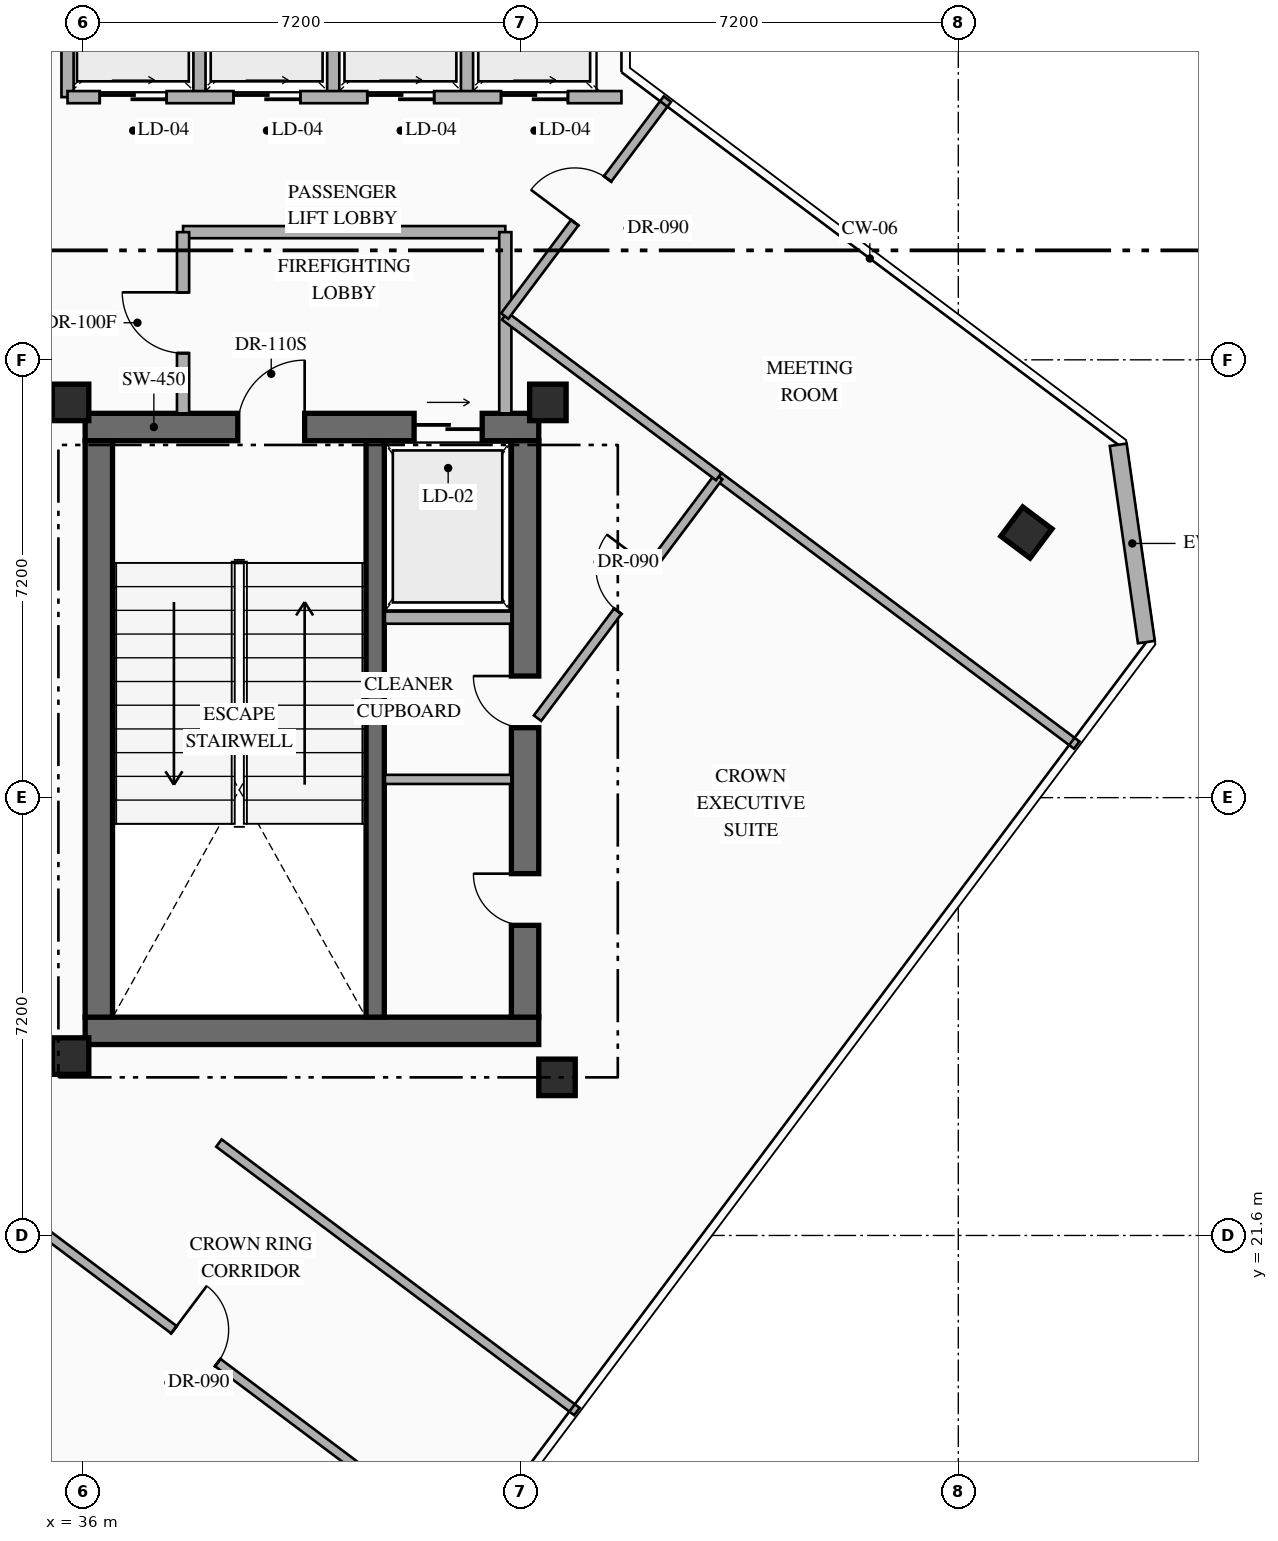
"""IFC4 building model, lengths in metres.
Left out: names, types, materials, properties, quantities, classifications, styles, units other than length and angle.
Written with IfcOpenShell. Run it as: python <this file> out.ifc"""

import sys

from ifc_helpers import new_model, si_unit, direction, frame, frame_2d, origin, origin_2d, place, context, subcontext, project, spatial, rectangle, hollow_rectangle, extrude, element, fill, save


model = new_model("IFC4")
c1 = context("Model", 3, precision=1e-05, world=origin(), true_north=direction((0.0, 1.0)))
c2 = subcontext(c1, "Body", "Model", "MODEL_VIEW")
j1 = project(units=[si_unit("LENGTHUNIT", "METRE"), si_unit("PLANEANGLEUNIT", "RADIAN")], contexts=[c1])
p1 = place(None, origin())
s1 = spatial("IfcSite", under=j1, at=p1, CompositionType="ELEMENT")
p2 = place(p1, origin())
s2 = spatial("IfcBuilding", under=s1, at=p2, CompositionType="ELEMENT")
p3 = place(p2, frame((0.0, 0.0, 277.95)))
s3 = spatial("IfcBuildingStorey", under=s2, at=p3, CompositionType="ELEMENT", Elevation=277.95)
p4 = place(p3, frame((36.04, 24.965, 0.0), z_axis=(0.0, 0.0, 1.0), x_axis=(1.0, 0.0, 0.0)))
e1 = element("IfcWall", 1, at=p4, inside=s3, PredefinedType="SHEAR", context=c2, shape_type="SweptSolid", body=[
    extrude(rectangle(XDim=7.46, YDim=0.45, at=frame_2d((3.73, 0.0))), origin(), (0.0, 0.0, 1.0), 4.0),
])
p5 = place(p3, frame((36.04, 34.895, 0.0), z_axis=(0.0, 0.0, 1.0), x_axis=(1.0, 0.0, 0.0)))
e2 = element("IfcWall", 2, at=p5, inside=s3, PredefinedType="SHEAR", context=c2, shape_type="SweptSolid", body=[
    extrude(rectangle(XDim=7.46, YDim=0.45, at=frame_2d((3.73, 0.0))), origin(), (0.0, 0.0, 1.0), 4.0),
])
p6 = place(p5, frame((2.51, 0.0, 0.0)))
e3 = element("IfcOpeningElement", 3, at=p6, cuts=e2, PredefinedType="OPENING", context=c2, shape_type="SweptSolid", body=[
    extrude(rectangle(XDim=1.1, YDim=2.2, at=frame_2d((0.55, 1.1))), frame((0.0, 0.235, 0.0), z_axis=(0.0, -1.0, 0.0), x_axis=(1.0, 0.0, 0.0)), (0.0, 0.0, 1.0), 0.47),
])
p7 = place(p5, frame((5.41, 0.0, 0.0)))
e4 = element("IfcOpeningElement", 4, at=p7, cuts=e2, PredefinedType="OPENING", context=c2, shape_type="SweptSolid", body=[
    extrude(rectangle(XDim=1.12, YDim=2.15, at=frame_2d((0.56, 1.075))), frame((0.0, 0.235, 0.0), z_axis=(0.0, -1.0, 0.0), x_axis=(1.0, 0.0, 0.0)), (0.0, 0.0, 1.0), 0.47),
])
p8 = place(p3, frame((36.265, 25.19, 0.0), z_axis=(0.0, 0.0, 1.0), x_axis=(0.0, 1.0, 0.0)))
e5 = element("IfcWall", 5, at=p8, inside=s3, PredefinedType="SHEAR", context=c2, shape_type="SweptSolid", body=[
    extrude(rectangle(XDim=9.48, YDim=0.45, at=frame_2d((4.74, 0.0))), origin(), (0.0, 0.0, 1.0), 4.0),
])
p9 = place(p3, frame((43.275, 25.19, 0.0), z_axis=(0.0, 0.0, 1.0), x_axis=(0.0, 1.0, 0.0)))
e6 = element("IfcWall", 6, at=p9, inside=s3, PredefinedType="SHEAR", context=c2, shape_type="SweptSolid", body=[
    extrude(rectangle(XDim=9.48, YDim=0.45, at=frame_2d((4.74, 0.0))), origin(), (0.0, 0.0, 1.0), 4.0),
])
p10 = place(p9, frame((1.51, 0.0, 0.0)))
e7 = element("IfcOpeningElement", 7, at=p10, cuts=e6, PredefinedType="OPENING", context=c2, shape_type="SweptSolid", body=[
    extrude(rectangle(XDim=0.85, YDim=2.08, at=frame_2d((0.425, 1.04))), frame((0.0, 0.235, 0.0), z_axis=(0.0, -1.0, 0.0), x_axis=(1.0, 0.0, 0.0)), (0.0, 0.0, 1.0), 0.47),
])
p11 = place(p9, frame((4.76, 0.0, 0.0)))
e8 = element("IfcOpeningElement", 8, at=p11, cuts=e6, PredefinedType="OPENING", context=c2, shape_type="SweptSolid", body=[
    extrude(rectangle(XDim=0.85, YDim=2.08, at=frame_2d((0.425, 1.04))), frame((0.0, 0.235, 0.0), z_axis=(0.0, -1.0, 0.0), x_axis=(1.0, 0.0, 0.0)), (0.0, 0.0, 1.0), 0.47),
])
p12 = place(p3, frame((40.81, 25.19, 0.0), z_axis=(0.0, 0.0, 1.0), x_axis=(0.0, 1.0, 0.0)))
e9 = element("IfcWall", 9, at=p12, inside=s3, PredefinedType="SHEAR", context=c2, shape_type="SweptSolid", body=[
    extrude(rectangle(XDim=9.48, YDim=0.3, at=frame_2d((4.74, 0.0))), origin(), (0.0, 0.0, 1.0), 4.0),
])
for number, where, z_axis, x_axis in (
    (10, (35.8, 24.55, 0.0), (0.0, 0.0, 1.0), (1.0, 0.0, 0.0)),
    (11, (43.8, 24.2, 0.0), (0.0, 0.0, 1.0), (1.0, 0.0, 0.0)),
    (12, (35.8, 35.3, 0.0), (0.0, 0.0, 1.0), (1.0, 0.0, 0.0)),
    (13, (43.65, 35.3, 0.0), (0.0, 0.0, 1.0), (1.0, 0.0, 0.0)),
    (14, (51.52, 33.16, 0.0), (0.0, 0.0, 1.0), (0.8, -0.6, 0.0)),
):
    element("IfcColumn", number, at=place(p3, frame(where, z_axis=z_axis, x_axis=x_axis)), inside=s3, PredefinedType="COLUMN", context=c2, shape_type="SweptSolid", body=[
        extrude(hollow_rectangle(XDim=0.6, YDim=0.6, WallThickness=0.025, at=origin_2d()), origin(), (0.0, 0.0, 1.0), 4.0),
    ])
p13 = place(p3, frame((53.03, 34.603, 0.0), z_axis=(0.0, 0.0, 1.0), x_axis=(0.141212810973, -0.989979263428, 0.0)))
e15 = element("IfcWall", 15, at=p13, inside=s3, PredefinedType="STANDARD", context=c2, shape_type="SweptSolid", body=[
    extrude(rectangle(XDim=3.278, YDim=0.28, at=frame_2d((1.639, 0.0))), origin(), (0.0, 0.0, 1.0), 3.74),
])
p14 = place(p3, frame((40.97, 31.76, 0.0), z_axis=(0.0, 0.0, 1.0), x_axis=(1.0, 0.0, 0.0)))
e16 = element("IfcWall", 16, at=p14, inside=s3, PredefinedType="STANDARD", context=c2, shape_type="SweptSolid", body=[
    extrude(rectangle(XDim=2.08, YDim=0.2, at=frame_2d((1.04, 0.0))), origin(), (0.0, 0.0, 1.0), 3.74),
])
p15 = place(p3, frame((40.97, 29.1, 0.0), z_axis=(0.0, 0.0, 1.0), x_axis=(1.0, 0.0, 0.0)))
e17 = element("IfcWall", 17, at=p15, inside=s3, PredefinedType="PARTITIONING", context=c2, shape_type="SweptSolid", body=[
    extrude(rectangle(XDim=2.08, YDim=0.15, at=frame_2d((1.04, 0.0))), origin(), (0.0, 0.0, 1.0), 3.74),
])
p16 = place(p3, frame((37.65, 38.1, 0.0), z_axis=(0.0, 0.0, 1.0), x_axis=(1.0, 0.0, 0.0)))
e18 = element("IfcWall", 18, at=p16, inside=s3, PredefinedType="STANDARD", context=c2, shape_type="SweptSolid", body=[
    extrude(rectangle(XDim=5.3, YDim=0.2, at=frame_2d((2.65, 0.0))), origin(), (0.0, 0.0, 1.0), 3.74),
])
p17 = place(p3, frame((42.95, 35.12, 0.0), z_axis=(0.0, 0.0, 1.0), x_axis=(0.0, 1.0, 0.0)))
e19 = element("IfcWall", 19, at=p17, inside=s3, PredefinedType="STANDARD", context=c2, shape_type="SweptSolid", body=[
    extrude(rectangle(XDim=2.98, YDim=0.2, at=frame_2d((1.49, 0.0))), origin(), (0.0, 0.0, 1.0), 3.74),
])
p18 = place(p3, frame((37.65, 35.12, 0.0), z_axis=(0.0, 0.0, 1.0), x_axis=(0.0, 1.0, 0.0)))
e20 = element("IfcWall", 20, at=p18, inside=s3, PredefinedType="STANDARD", context=c2, shape_type="SweptSolid", body=[
    extrude(rectangle(XDim=2.98, YDim=0.2, at=frame_2d((1.49, 0.0))), origin(), (0.0, 0.0, 1.0), 3.74),
])
p19 = place(p18, frame((0.99, 0.0, 0.0)))
e21 = element("IfcOpeningElement", 21, at=p19, cuts=e20, PredefinedType="OPENING", context=c2, shape_type="SweptSolid", body=[
    extrude(rectangle(XDim=1.0, YDim=2.2, at=frame_2d((0.5, 1.1))), frame((0.0, 0.11, 0.0), z_axis=(0.0, -1.0, 0.0), x_axis=(1.0, 0.0, 0.0)), (0.0, 0.0, 1.0), 0.22),
])
for number, where, z_axis, x_axis in (
    (22, (35.75, 40.32, 0.0), (0.0, 0.0, 1.0), (0.0, 1.0, 0.0)),
    (23, (37.92, 40.32, 0.0), (0.0, 0.0, 1.0), (0.0, 1.0, 0.0)),
    (24, (40.12, 40.32, 0.0), (0.0, 0.0, 1.0), (0.0, 1.0, 0.0)),
    (25, (42.32, 40.32, 0.0), (0.0, 0.0, 1.0), (0.0, 1.0, 0.0)),
):
    element("IfcWall", number, at=place(p3, frame(where, z_axis=z_axis, x_axis=x_axis)), inside=s3, PredefinedType="STANDARD", context=c2, shape_type="SweptSolid", body=[
        extrude(rectangle(XDim=2.16, YDim=0.2, at=frame_2d((1.08, 0.0))), origin(), (0.0, 0.0, 1.0), 3.74),
    ])
p20 = place(p3, frame((35.75, 40.32, 0.0), z_axis=(0.0, 0.0, 1.0), x_axis=(1.0, 0.0, 0.0)))
e26 = element("IfcWall", 26, at=p20, inside=s3, PredefinedType="STANDARD", context=c2, shape_type="SweptSolid", body=[
    extrude(rectangle(XDim=9.11, YDim=0.2, at=frame_2d((4.555, 0.0))), origin(), (0.0, 0.0, 1.0), 3.74),
])
p21 = place(p20, frame((0.53, 0.0, 0.0)))
e27 = element("IfcOpeningElement", 27, at=p21, cuts=e26, PredefinedType="OPENING", context=c2, shape_type="SweptSolid", body=[
    extrude(rectangle(XDim=1.1, YDim=2.18, at=frame_2d((0.55, 1.09))), frame((0.0, 0.11, 0.0), z_axis=(0.0, -1.0, 0.0), x_axis=(1.0, 0.0, 0.0)), (0.0, 0.0, 1.0), 0.22),
])
p22 = place(p20, frame((2.73, 0.0, 0.0)))
e28 = element("IfcOpeningElement", 28, at=p22, cuts=e26, PredefinedType="OPENING", context=c2, shape_type="SweptSolid", body=[
    extrude(rectangle(XDim=1.1, YDim=2.18, at=frame_2d((0.55, 1.09))), frame((0.0, 0.11, 0.0), z_axis=(0.0, -1.0, 0.0), x_axis=(1.0, 0.0, 0.0)), (0.0, 0.0, 1.0), 0.22),
])
p23 = place(p20, frame((4.93, 0.0, 0.0)))
e29 = element("IfcOpeningElement", 29, at=p23, cuts=e26, PredefinedType="OPENING", context=c2, shape_type="SweptSolid", body=[
    extrude(rectangle(XDim=1.1, YDim=2.18, at=frame_2d((0.55, 1.09))), frame((0.0, 0.11, 0.0), z_axis=(0.0, -1.0, 0.0), x_axis=(1.0, 0.0, 0.0)), (0.0, 0.0, 1.0), 0.22),
])
p24 = place(p20, frame((7.13, 0.0, 0.0)))
e30 = element("IfcOpeningElement", 30, at=p24, cuts=e26, PredefinedType="OPENING", context=c2, shape_type="SweptSolid", body=[
    extrude(rectangle(XDim=1.1, YDim=2.18, at=frame_2d((0.55, 1.09))), frame((0.0, 0.11, 0.0), z_axis=(0.0, -1.0, 0.0), x_axis=(1.0, 0.0, 0.0)), (0.0, 0.0, 1.0), 0.22),
])
p25 = place(p3, frame((28.18, 27.04, 0.0), z_axis=(0.0, 0.0, 1.0), x_axis=(0.8, -0.6, 0.0)))
e31 = element("IfcWall", 31, at=p25, inside=s3, PredefinedType="PARTITIONING", context=c2, shape_type="SweptSolid", body=[
    extrude(rectangle(XDim=17.76, YDim=0.15, at=frame_2d((8.88, 0.0))), origin(), (0.0, 0.0, 1.0), 3.74),
])
p26 = place(p25, frame((11.65, 0.0, 0.0)))
e32 = element("IfcOpeningElement", 32, at=p26, cuts=e31, PredefinedType="OPENING", context=c2, shape_type="SweptSolid", body=[
    extrude(rectangle(XDim=0.9, YDim=2.15, at=frame_2d((0.45, 1.075))), frame((0.0, 0.085, 0.0), z_axis=(0.0, -1.0, 0.0), x_axis=(1.0, 0.0, 0.0)), (0.0, 0.0, 1.0), 0.17),
])
for number, where, z_axis, x_axis in (
    (33, (38.24, 23.12, 0.0), (0.0, 0.0, 1.0), (0.8, -0.6, 0.0)),
    (34, (46.46, 34.08, 0.0), (0.0, 0.0, 1.0), (0.8, -0.6, 0.0)),
):
    element("IfcWall", number, at=place(p3, frame(where, z_axis=z_axis, x_axis=x_axis)), inside=s3, PredefinedType="PARTITIONING", context=c2, shape_type="SweptSolid", body=[
        extrude(rectangle(XDim=7.36, YDim=0.15, at=frame_2d((3.68, 0.0))), origin(), (0.0, 0.0, 1.0), 3.74),
    ])
p27 = place(p3, frame((43.48, 30.107, 0.0), z_axis=(0.0, 0.0, 1.0), x_axis=(0.600015730265, 0.799988202059, 0.0)))
e35 = element("IfcWall", 35, at=p27, inside=s3, PredefinedType="PARTITIONING", context=c2, shape_type="SweptSolid", body=[
    extrude(rectangle(XDim=4.967, YDim=0.15, at=frame_2d((2.483, 0.0))), origin(), (0.0, 0.0, 1.0), 3.74),
])
p28 = place(p27, frame((2.199, 0.0, 0.0)))
e36 = element("IfcOpeningElement", 36, at=p28, cuts=e35, PredefinedType="OPENING", context=c2, shape_type="SweptSolid", body=[
    extrude(rectangle(XDim=0.9, YDim=2.15, at=frame_2d((0.45, 1.075))), frame((0.0, 0.085, 0.0), z_axis=(0.0, -1.0, 0.0), x_axis=(1.0, 0.0, 0.0)), (0.0, 0.0, 1.0), 0.17),
])
p29 = place(p3, frame((42.94, 36.72, 0.0), z_axis=(0.0, 0.0, 1.0), x_axis=(0.800013316712, -0.599982243973, 0.0)))
e37 = element("IfcWall", 37, at=p29, inside=s3, PredefinedType="PARTITIONING", context=c2, shape_type="SweptSolid", body=[
    extrude(rectangle(XDim=4.4, YDim=0.15, at=frame_2d((2.2, 0.0))), origin(), (0.0, 0.0, 1.0), 3.295),
])
p30 = place(p3, frame((42.94, 36.72, 0.0), z_axis=(0.0, 0.0, 1.0), x_axis=(0.599991241767, 0.8000065686, 0.0)))
e38 = element("IfcWall", 38, at=p30, inside=s3, PredefinedType="PARTITIONING", context=c2, shape_type="SweptSolid", body=[
    extrude(rectangle(XDim=4.46, YDim=0.15, at=frame_2d((2.23, 0.0))), origin(), (0.0, 0.0, 1.0), 3.74),
])
p31 = place(p30, frame((1.92, 0.0, 0.0)))
e39 = element("IfcOpeningElement", 39, at=p31, cuts=e38, PredefinedType="OPENING", context=c2, shape_type="SweptSolid", body=[
    extrude(rectangle(XDim=0.9, YDim=2.15, at=frame_2d((0.45, 1.075))), frame((0.0, 0.085, 0.0), z_axis=(0.0, -1.0, 0.0), x_axis=(1.0, 0.0, 0.0)), (0.0, 0.0, 1.0), 0.17),
])
p32 = place(p6, origin())
e40 = element("IfcDoor", 40, at=p32, inside=s3, OperationType="SINGLE_SWING_RIGHT", PredefinedType="DOOR", context=c2, shape_type="SweptSolid", body=[
    extrude(rectangle(XDim=1.1, YDim=2.2, at=frame_2d((0.55, 1.1))), frame((0.0, 0.025, 0.0), z_axis=(0.0, -1.0, 0.0), x_axis=(1.0, 0.0, 0.0)), (0.0, 0.0, 1.0), 0.05),
])
fill(e3, e40)
p33 = place(p7, origin())
e41 = element("IfcDoor", 41, at=p33, inside=s3, OperationType="SLIDING_TO_RIGHT", PredefinedType="USERDEFINED", context=c2, shape_type="SweptSolid", body=[
    extrude(rectangle(XDim=1.12, YDim=2.15, at=frame_2d((0.56, 1.075))), frame((0.0, 0.025, 0.0), z_axis=(0.0, -1.0, 0.0), x_axis=(1.0, 0.0, 0.0)), (0.0, 0.0, 1.0), 0.05),
])
fill(e4, e41)
p34 = place(p10, origin())
e42 = element("IfcDoor", 42, at=p34, inside=s3, OperationType="SINGLE_SWING_RIGHT", PredefinedType="DOOR", context=c2, shape_type="SweptSolid", body=[
    extrude(rectangle(XDim=0.85, YDim=2.08, at=frame_2d((0.425, 1.04))), frame((0.0, 0.025, 0.0), z_axis=(0.0, -1.0, 0.0), x_axis=(1.0, 0.0, 0.0)), (0.0, 0.0, 1.0), 0.05),
])
fill(e7, e42)
p35 = place(p11, origin())
e43 = element("IfcDoor", 43, at=p35, inside=s3, OperationType="SINGLE_SWING_RIGHT", PredefinedType="DOOR", context=c2, shape_type="SweptSolid", body=[
    extrude(rectangle(XDim=0.85, YDim=2.08, at=frame_2d((0.425, 1.04))), frame((0.0, 0.025, 0.0), z_axis=(0.0, -1.0, 0.0), x_axis=(1.0, 0.0, 0.0)), (0.0, 0.0, 1.0), 0.05),
])
fill(e8, e43)
p36 = place(p19, origin())
e44 = element("IfcDoor", 44, at=p36, inside=s3, OperationType="SINGLE_SWING_RIGHT", PredefinedType="DOOR", context=c2, shape_type="SweptSolid", body=[
    extrude(rectangle(XDim=1.0, YDim=2.2, at=frame_2d((0.5, 1.1))), frame((0.0, 0.025, 0.0), z_axis=(0.0, -1.0, 0.0), x_axis=(1.0, 0.0, 0.0)), (0.0, 0.0, 1.0), 0.05),
])
fill(e21, e44)
p37 = place(p21, origin())
e45 = element("IfcDoor", 45, at=p37, inside=s3, OperationType="SLIDING_TO_RIGHT", PredefinedType="USERDEFINED", context=c2, shape_type="SweptSolid", body=[
    extrude(rectangle(XDim=1.1, YDim=2.18, at=frame_2d((0.55, 1.09))), frame((0.0, 0.025, 0.0), z_axis=(0.0, -1.0, 0.0), x_axis=(1.0, 0.0, 0.0)), (0.0, 0.0, 1.0), 0.05),
])
fill(e27, e45)
p38 = place(p22, origin())
e46 = element("IfcDoor", 46, at=p38, inside=s3, OperationType="SLIDING_TO_RIGHT", PredefinedType="USERDEFINED", context=c2, shape_type="SweptSolid", body=[
    extrude(rectangle(XDim=1.1, YDim=2.18, at=frame_2d((0.55, 1.09))), frame((0.0, 0.025, 0.0), z_axis=(0.0, -1.0, 0.0), x_axis=(1.0, 0.0, 0.0)), (0.0, 0.0, 1.0), 0.05),
])
fill(e28, e46)
p39 = place(p23, origin())
e47 = element("IfcDoor", 47, at=p39, inside=s3, OperationType="SLIDING_TO_RIGHT", PredefinedType="USERDEFINED", context=c2, shape_type="SweptSolid", body=[
    extrude(rectangle(XDim=1.1, YDim=2.18, at=frame_2d((0.55, 1.09))), frame((0.0, 0.025, 0.0), z_axis=(0.0, -1.0, 0.0), x_axis=(1.0, 0.0, 0.0)), (0.0, 0.0, 1.0), 0.05),
])
fill(e29, e47)
p40 = place(p24, origin())
e48 = element("IfcDoor", 48, at=p40, inside=s3, OperationType="SLIDING_TO_RIGHT", PredefinedType="USERDEFINED", context=c2, shape_type="SweptSolid", body=[
    extrude(rectangle(XDim=1.1, YDim=2.18, at=frame_2d((0.55, 1.09))), frame((0.0, 0.025, 0.0), z_axis=(0.0, -1.0, 0.0), x_axis=(1.0, 0.0, 0.0)), (0.0, 0.0, 1.0), 0.05),
])
fill(e30, e48)
p41 = place(p26, origin())
e49 = element("IfcDoor", 49, at=p41, inside=s3, OperationType="SINGLE_SWING_LEFT", PredefinedType="DOOR", context=c2, shape_type="SweptSolid", body=[
    extrude(rectangle(XDim=0.9, YDim=2.15, at=frame_2d((0.45, 1.075))), frame((0.0, 0.025, 0.0), z_axis=(0.0, -1.0, 0.0), x_axis=(1.0, 0.0, 0.0)), (0.0, 0.0, 1.0), 0.05),
])
fill(e32, e49)
p42 = place(p28, origin())
e50 = element("IfcDoor", 50, at=p42, inside=s3, OperationType="SINGLE_SWING_RIGHT", PredefinedType="DOOR", context=c2, shape_type="SweptSolid", body=[
    extrude(rectangle(XDim=0.9, YDim=2.15, at=frame_2d((0.45, 1.075))), frame((0.0, 0.025, 0.0), z_axis=(0.0, -1.0, 0.0), x_axis=(1.0, 0.0, 0.0)), (0.0, 0.0, 1.0), 0.05),
])
fill(e36, e50)
p43 = place(p31, origin())
e51 = element("IfcDoor", 51, at=p43, inside=s3, OperationType="SINGLE_SWING_LEFT", PredefinedType="DOOR", context=c2, shape_type="SweptSolid", body=[
    extrude(rectangle(XDim=0.9, YDim=2.15, at=frame_2d((0.45, 1.075))), frame((0.0, 0.025, 0.0), z_axis=(0.0, -1.0, 0.0), x_axis=(1.0, 0.0, 0.0)), (0.0, 0.0, 1.0), 0.05),
])
fill(e39, e51)
save(model, sys.argv[1])
